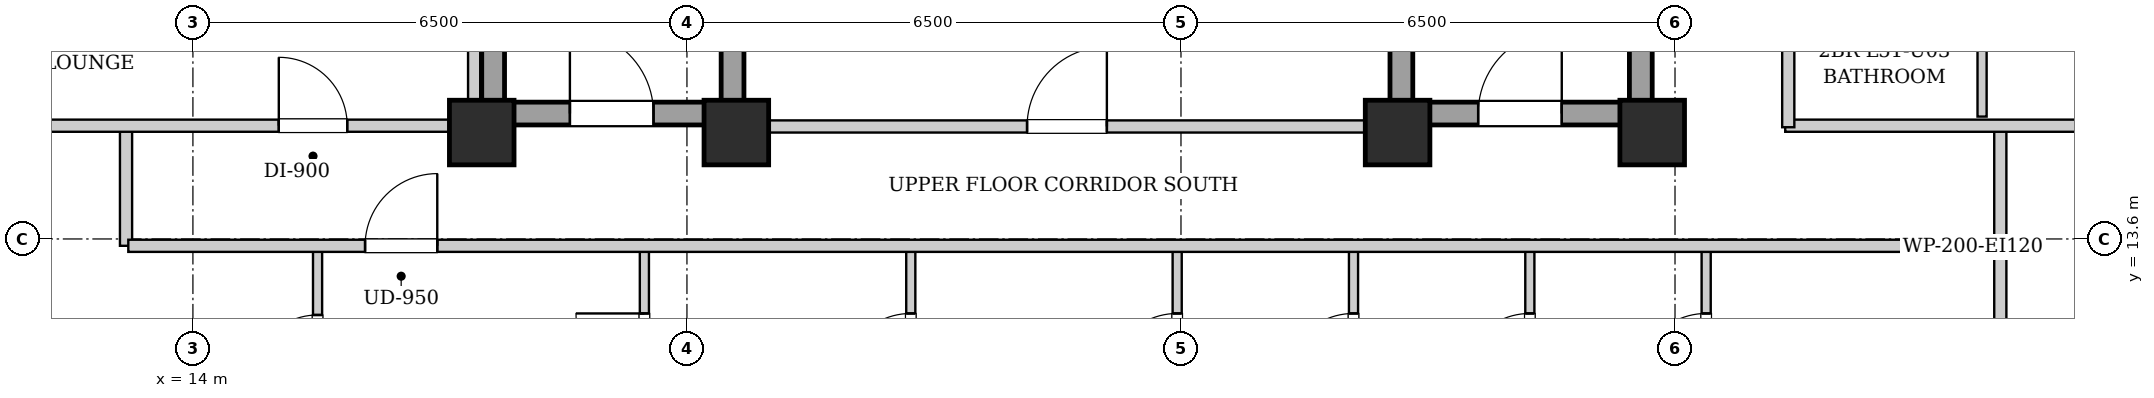
"""IFC4 building model, lengths in metres.
Left out: names, types, materials, properties, quantities, classifications, styles, units other than length and angle.
Written with IfcOpenShell. Run it as: python <this file> out.ifc"""

import sys

from ifc_helpers import new_model, si_unit, direction, frame, frame_2d, origin, origin_2d, place, context, subcontext, project, spatial, rectangle, extrude, element, fill, save


model = new_model("IFC4")
c1 = context("Model", 3, precision=1e-05, world=origin(), true_north=direction((0.0, 1.0)))
c2 = subcontext(c1, "Body", "Model", "MODEL_VIEW")
j1 = project(units=[si_unit("LENGTHUNIT", "METRE"), si_unit("PLANEANGLEUNIT", "RADIAN")], contexts=[c1])
p1 = place(None, origin())
s1 = spatial("IfcSite", under=j1, at=p1, CompositionType="ELEMENT")
p2 = place(p1, origin())
s2 = spatial("IfcBuilding", under=s1, at=p2, CompositionType="ELEMENT")
p3 = place(p2, frame((0.0, 0.0, 177.7)))
s3 = spatial("IfcBuildingStorey", under=s2, at=p3, CompositionType="ELEMENT", Elevation=177.7)
for number, where, z_axis, x_axis in (
    (1, (17.8, 15.0, 0.0), (0.0, 0.0, 1.0), (1.0, 0.0, 0.0)),
    (2, (21.15, 15.0, 0.0), (0.0, 0.0, 1.0), (1.0, 0.0, 0.0)),
    (3, (29.85, 15.0, 0.0), (0.0, 0.0, 1.0), (1.0, 0.0, 0.0)),
    (4, (33.2, 15.0, 0.0), (0.0, 0.0, 1.0), (1.0, 0.0, 0.0)),
):
    element("IfcColumn", number, at=place(p3, frame(where, z_axis=z_axis, x_axis=x_axis)), inside=s3, PredefinedType="COLUMN", context=c2, shape_type="SweptSolid", body=[
        extrude(rectangle(XDim=0.85, YDim=0.85, at=origin_2d()), origin(), (0.0, 0.0, 1.0), 3.3),
    ])
for number, where, z_axis, x_axis in (
    (5, (17.95, 15.1, 0.0), (0.0, 0.0, 1.0), (0.0, 1.0, 0.0)),
    (6, (21.1, 15.1, 0.0), (0.0, 0.0, 1.0), (0.0, 1.0, 0.0)),
):
    element("IfcWall", number, at=place(p3, frame(where, z_axis=z_axis, x_axis=x_axis)), inside=s3, PredefinedType="SHEAR", context=c2, shape_type="SweptSolid", body=[
        extrude(rectangle(XDim=9.0, YDim=0.3, at=frame_2d((4.5, 0.0))), origin(), (0.0, 0.0, 1.0), 3.04),
    ])
p4 = place(p3, frame((18.1, 15.25, 0.0), z_axis=(0.0, 0.0, 1.0), x_axis=(1.0, 0.0, 0.0)))
e7 = element("IfcWall", 7, at=p4, inside=s3, PredefinedType="SHEAR", context=c2, shape_type="SweptSolid", body=[
    extrude(rectangle(XDim=2.85, YDim=0.3, at=frame_2d((1.425, 0.0))), origin(), (0.0, 0.0, 1.0), 3.04),
])
p5 = place(p4, frame((0.86, 0.0, 0.0)))
e8 = element("IfcOpeningElement", 8, at=p5, cuts=e7, PredefinedType="OPENING", context=c2, shape_type="SweptSolid", body=[
    extrude(rectangle(XDim=1.1, YDim=2.05, at=frame_2d((0.55, 1.025))), frame((0.0, 0.16, 0.0), z_axis=(0.0, -1.0, 0.0), x_axis=(1.0, 0.0, 0.0)), (0.0, 0.0, 1.0), 0.32),
])
for number, where, z_axis, x_axis in (
    (9, (29.9, 15.1, 0.0), (0.0, 0.0, 1.0), (0.0, 1.0, 0.0)),
    (10, (33.05, 15.1, 0.0), (0.0, 0.0, 1.0), (0.0, 1.0, 0.0)),
):
    element("IfcWall", number, at=place(p3, frame(where, z_axis=z_axis, x_axis=x_axis)), inside=s3, PredefinedType="SHEAR", context=c2, shape_type="SweptSolid", body=[
        extrude(rectangle(XDim=9.0, YDim=0.3, at=frame_2d((4.5, 0.0))), origin(), (0.0, 0.0, 1.0), 3.04),
    ])
p6 = place(p3, frame((30.05, 15.25, 0.0), z_axis=(0.0, 0.0, 1.0), x_axis=(1.0, 0.0, 0.0)))
e11 = element("IfcWall", 11, at=p6, inside=s3, PredefinedType="SHEAR", context=c2, shape_type="SweptSolid", body=[
    extrude(rectangle(XDim=2.85, YDim=0.3, at=frame_2d((1.425, 0.0))), origin(), (0.0, 0.0, 1.0), 3.04),
])
p7 = place(p6, frame((0.86, 0.0, 0.0)))
e12 = element("IfcOpeningElement", 12, at=p7, cuts=e11, PredefinedType="OPENING", context=c2, shape_type="SweptSolid", body=[
    extrude(rectangle(XDim=1.1, YDim=2.05, at=frame_2d((0.55, 1.025))), frame((0.0, 0.16, 0.0), z_axis=(0.0, -1.0, 0.0), x_axis=(1.0, 0.0, 0.0)), (0.0, 0.0, 1.0), 0.32),
])
p8 = place(p3, frame((21.25, 15.08, 0.0), z_axis=(0.0, 0.0, 1.0), x_axis=(1.0, 0.0, 0.0)))
e13 = element("IfcWall", 13, at=p8, inside=s3, PredefinedType="PARTITIONING", context=c2, shape_type="SweptSolid", body=[
    extrude(rectangle(XDim=8.5, YDim=0.16, at=frame_2d((4.25, 0.0))), origin(), (0.0, 0.0, 1.0), 2.556),
])
p9 = place(p8, frame((3.725, 0.0, 0.0)))
e14 = element("IfcOpeningElement", 14, at=p9, cuts=e13, PredefinedType="OPENING", context=c2, shape_type="SweptSolid", body=[
    extrude(rectangle(XDim=1.05, YDim=2.05, at=frame_2d((0.525, 1.025))), frame((0.0, 0.09, 0.0), z_axis=(0.0, -1.0, 0.0), x_axis=(1.0, 0.0, 0.0)), (0.0, 0.0, 1.0), 0.18),
])
for number, where, z_axis, x_axis in (
    (15, (13.12, 13.51, 0.0), (0.0, 0.0, 1.0), (0.0, 1.0, 0.0)),
    (16, (37.78, 13.51, 0.0), (0.0, 0.0, 1.0), (0.0, 1.0, 0.0)),
):
    element("IfcWall", number, at=place(p3, frame(where, z_axis=z_axis, x_axis=x_axis)), inside=s3, PredefinedType="PARTITIONING", context=c2, shape_type="SweptSolid", body=[
        extrude(rectangle(XDim=1.58, YDim=0.16, at=frame_2d((0.79, 0.0))), origin(), (0.0, 0.0, 1.0), 3.04),
    ])
p10 = place(p3, frame((10.88, 15.09, 0.0), z_axis=(0.0, 0.0, 1.0), x_axis=(1.0, 0.0, 0.0)))
e17 = element("IfcWall", 17, at=p10, inside=s3, PredefinedType="PARTITIONING", context=c2, shape_type="SweptSolid", body=[
    extrude(rectangle(XDim=6.88, YDim=0.16, at=frame_2d((3.44, 0.0))), origin(), (0.0, 0.0, 1.0), 2.556),
])
p11 = place(p10, frame((4.25, 0.0, 0.0)))
e18 = element("IfcOpeningElement", 18, at=p11, cuts=e17, PredefinedType="OPENING", context=c2, shape_type="SweptSolid", body=[
    extrude(rectangle(XDim=0.9, YDim=2.05, at=frame_2d((0.45, 1.025))), frame((0.0, 0.09, 0.0), z_axis=(0.0, -1.0, 0.0), x_axis=(1.0, 0.0, 0.0)), (0.0, 0.0, 1.0), 0.18),
])
p12 = place(p3, frame((34.95, 15.09, 0.0), z_axis=(0.0, 0.0, 1.0), x_axis=(1.0, 0.0, 0.0)))
e19 = element("IfcWall", 19, at=p12, inside=s3, PredefinedType="PARTITIONING", context=c2, shape_type="SweptSolid", body=[
    extrude(rectangle(XDim=5.07, YDim=0.16, at=frame_2d((2.535, 0.0))), origin(), (0.0, 0.0, 1.0), 2.556),
])
p13 = place(p3, frame((37.78, 10.81, 0.0), z_axis=(0.0, 0.0, 1.0), x_axis=(0.0, 1.0, 0.0)))
e20 = element("IfcWall", 20, at=p13, inside=s3, PredefinedType="PARTITIONING", context=c2, shape_type="SweptSolid", body=[
    extrude(rectangle(XDim=2.66, YDim=0.16, at=frame_2d((1.33, 0.0))), origin(), (0.0, 0.0, 1.0), 3.04),
])
p14 = place(p3, frame((15.64, 10.87, 0.0), z_axis=(0.0, 0.0, 1.0), x_axis=(0.0, 1.0, 0.0)))
e21 = element("IfcWall", 21, at=p14, inside=s3, PredefinedType="PARTITIONING", context=c2, shape_type="SweptSolid", body=[
    extrude(rectangle(XDim=2.6, YDim=0.12, at=frame_2d((1.3, 0.0))), origin(), (0.0, 0.0, 1.0), 3.04),
])
p15 = place(p14, frame((0.87, 0.0, 0.0)))
e22 = element("IfcOpeningElement", 22, at=p15, cuts=e21, PredefinedType="OPENING", context=c2, shape_type="SweptSolid", body=[
    extrude(rectangle(XDim=0.86, YDim=2.05, at=frame_2d((0.43, 1.025))), frame((0.0, 0.07, 0.0), z_axis=(0.0, -1.0, 0.0), x_axis=(1.0, 0.0, 0.0)), (0.0, 0.0, 1.0), 0.14),
])
p16 = place(p3, frame((19.94, 10.87, 0.0), z_axis=(0.0, 0.0, 1.0), x_axis=(0.0, 1.0, 0.0)))
e23 = element("IfcWall", 23, at=p16, inside=s3, PredefinedType="PARTITIONING", context=c2, shape_type="SweptSolid", body=[
    extrude(rectangle(XDim=2.6, YDim=0.12, at=frame_2d((1.3, 0.0))), origin(), (0.0, 0.0, 1.0), 3.04),
])
p17 = place(p16, frame((0.85, 0.0, 0.0)))
e24 = element("IfcOpeningElement", 24, at=p17, cuts=e23, PredefinedType="OPENING", context=c2, shape_type="SweptSolid", body=[
    extrude(rectangle(XDim=0.9, YDim=2.05, at=frame_2d((0.45, 1.025))), frame((0.0, 0.07, 0.0), z_axis=(0.0, -1.0, 0.0), x_axis=(1.0, 0.0, 0.0)), (0.0, 0.0, 1.0), 0.14),
])
p18 = place(p3, frame((23.445, 10.87, 0.0), z_axis=(0.0, 0.0, 1.0), x_axis=(0.0, 1.0, 0.0)))
e25 = element("IfcWall", 25, at=p18, inside=s3, PredefinedType="PARTITIONING", context=c2, shape_type="SweptSolid", body=[
    extrude(rectangle(XDim=2.6, YDim=0.12, at=frame_2d((1.3, 0.0))), origin(), (0.0, 0.0, 1.0), 3.04),
])
p19 = place(p18, frame((0.85, 0.0, 0.0)))
e26 = element("IfcOpeningElement", 26, at=p19, cuts=e25, PredefinedType="OPENING", context=c2, shape_type="SweptSolid", body=[
    extrude(rectangle(XDim=0.9, YDim=2.05, at=frame_2d((0.45, 1.025))), frame((0.0, 0.07, 0.0), z_axis=(0.0, -1.0, 0.0), x_axis=(1.0, 0.0, 0.0)), (0.0, 0.0, 1.0), 0.14),
])
p20 = place(p3, frame((26.95, 10.87, 0.0), z_axis=(0.0, 0.0, 1.0), x_axis=(0.0, 1.0, 0.0)))
e27 = element("IfcWall", 27, at=p20, inside=s3, PredefinedType="PARTITIONING", context=c2, shape_type="SweptSolid", body=[
    extrude(rectangle(XDim=2.6, YDim=0.12, at=frame_2d((1.3, 0.0))), origin(), (0.0, 0.0, 1.0), 3.04),
])
p21 = place(p20, frame((0.85, 0.0, 0.0)))
e28 = element("IfcOpeningElement", 28, at=p21, cuts=e27, PredefinedType="OPENING", context=c2, shape_type="SweptSolid", body=[
    extrude(rectangle(XDim=0.9, YDim=2.05, at=frame_2d((0.45, 1.025))), frame((0.0, 0.07, 0.0), z_axis=(0.0, -1.0, 0.0), x_axis=(1.0, 0.0, 0.0)), (0.0, 0.0, 1.0), 0.14),
])
p22 = place(p3, frame((29.27, 10.87, 0.0), z_axis=(0.0, 0.0, 1.0), x_axis=(0.0, 1.0, 0.0)))
e29 = element("IfcWall", 29, at=p22, inside=s3, PredefinedType="PARTITIONING", context=c2, shape_type="SweptSolid", body=[
    extrude(rectangle(XDim=2.6, YDim=0.12, at=frame_2d((1.3, 0.0))), origin(), (0.0, 0.0, 1.0), 3.04),
])
p23 = place(p22, frame((0.85, 0.0, 0.0)))
e30 = element("IfcOpeningElement", 30, at=p23, cuts=e29, PredefinedType="OPENING", context=c2, shape_type="SweptSolid", body=[
    extrude(rectangle(XDim=0.9, YDim=2.05, at=frame_2d((0.45, 1.025))), frame((0.0, 0.07, 0.0), z_axis=(0.0, -1.0, 0.0), x_axis=(1.0, 0.0, 0.0)), (0.0, 0.0, 1.0), 0.14),
])
p24 = place(p3, frame((31.59, 10.87, 0.0), z_axis=(0.0, 0.0, 1.0), x_axis=(0.0, 1.0, 0.0)))
e31 = element("IfcWall", 31, at=p24, inside=s3, PredefinedType="PARTITIONING", context=c2, shape_type="SweptSolid", body=[
    extrude(rectangle(XDim=2.6, YDim=0.12, at=frame_2d((1.3, 0.0))), origin(), (0.0, 0.0, 1.0), 3.04),
])
p25 = place(p24, frame((0.85, 0.0, 0.0)))
e32 = element("IfcOpeningElement", 32, at=p25, cuts=e31, PredefinedType="OPENING", context=c2, shape_type="SweptSolid", body=[
    extrude(rectangle(XDim=0.9, YDim=2.05, at=frame_2d((0.45, 1.025))), frame((0.0, 0.07, 0.0), z_axis=(0.0, -1.0, 0.0), x_axis=(1.0, 0.0, 0.0)), (0.0, 0.0, 1.0), 0.14),
])
p26 = place(p3, frame((33.91, 10.87, 0.0), z_axis=(0.0, 0.0, 1.0), x_axis=(0.0, 1.0, 0.0)))
e33 = element("IfcWall", 33, at=p26, inside=s3, PredefinedType="PARTITIONING", context=c2, shape_type="SweptSolid", body=[
    extrude(rectangle(XDim=2.6, YDim=0.12, at=frame_2d((1.3, 0.0))), origin(), (0.0, 0.0, 1.0), 3.04),
])
p27 = place(p26, frame((0.85, 0.0, 0.0)))
e34 = element("IfcOpeningElement", 34, at=p27, cuts=e33, PredefinedType="OPENING", context=c2, shape_type="SweptSolid", body=[
    extrude(rectangle(XDim=0.9, YDim=2.05, at=frame_2d((0.45, 1.025))), frame((0.0, 0.07, 0.0), z_axis=(0.0, -1.0, 0.0), x_axis=(1.0, 0.0, 0.0)), (0.0, 0.0, 1.0), 0.14),
])
p28 = place(p3, frame((37.54, 15.21, 0.0), z_axis=(0.0, 0.0, 1.0), x_axis=(0.0, 1.0, 0.0)))
e35 = element("IfcWall", 35, at=p28, inside=s3, PredefinedType="PARTITIONING", context=c2, shape_type="SweptSolid", body=[
    extrude(rectangle(XDim=2.3, YDim=0.12, at=frame_2d((1.15, 0.0))), origin(), (0.0, 0.0, 1.0), 3.04),
])
p29 = place(p3, frame((13.15, 13.51, 0.0), z_axis=(0.0, 0.0, 1.0), x_axis=(1.0, 0.0, 0.0)))
e36 = element("IfcWall", 36, at=p29, inside=s3, PredefinedType="PARTITIONING", context=c2, shape_type="SweptSolid", body=[
    extrude(rectangle(XDim=24.6, YDim=0.16, at=frame_2d((12.3, 0.0))), origin(), (0.0, 0.0, 1.0), 3.04),
])
p30 = place(p29, frame((3.115, 0.0, 0.0)))
e37 = element("IfcOpeningElement", 37, at=p30, cuts=e36, PredefinedType="OPENING", context=c2, shape_type="SweptSolid", body=[
    extrude(rectangle(XDim=0.95, YDim=2.1, at=frame_2d((0.475, 1.05))), frame((0.0, 0.09, 0.0), z_axis=(0.0, -1.0, 0.0), x_axis=(1.0, 0.0, 0.0)), (0.0, 0.0, 1.0), 0.18),
])
p31 = place(p3, frame((17.7, 15.02, 0.0), z_axis=(0.0, 0.0, 1.0), x_axis=(0.0, 1.0, 0.0)))
e38 = element("IfcWall", 38, at=p31, inside=s3, PredefinedType="PARTITIONING", context=c2, shape_type="SweptSolid", body=[
    extrude(rectangle(XDim=13.98, YDim=0.16, at=frame_2d((6.99, 0.0))), origin(), (0.0, 0.0, 1.0), 2.375),
])
p32 = place(p3, frame((34.99, 15.07, 0.0), z_axis=(0.0, 0.0, 1.0), x_axis=(0.0, 1.0, 0.0)))
e39 = element("IfcWall", 39, at=p32, inside=s3, PredefinedType="PARTITIONING", context=c2, shape_type="SweptSolid", body=[
    extrude(rectangle(XDim=13.93, YDim=0.16, at=frame_2d((6.965, 0.0))), origin(), (0.0, 0.0, 1.0), 3.04),
])
p33 = place(p32, frame((4.385, 0.0, 0.0)))
e40 = element("IfcOpeningElement", 40, at=p33, cuts=e39, PredefinedType="OPENING", context=c2, shape_type="SweptSolid", body=[
    extrude(rectangle(XDim=0.95, YDim=2.1, at=frame_2d((0.475, 1.05))), frame((0.0, 0.09, 0.0), z_axis=(0.0, -1.0, 0.0), x_axis=(1.0, 0.0, 0.0)), (0.0, 0.0, 1.0), 0.18),
])
p34 = place(p5, origin())
e41 = element("IfcDoor", 41, at=p34, inside=s3, OperationType="SINGLE_SWING_LEFT", PredefinedType="DOOR", context=c2, shape_type="SweptSolid", body=[
    extrude(rectangle(XDim=1.1, YDim=2.05, at=frame_2d((0.55, 1.025))), frame((0.0, 0.025, 0.0), z_axis=(0.0, -1.0, 0.0), x_axis=(1.0, 0.0, 0.0)), (0.0, 0.0, 1.0), 0.05),
])
fill(e8, e41)
p35 = place(p7, origin())
e42 = element("IfcDoor", 42, at=p35, inside=s3, OperationType="SINGLE_SWING_RIGHT", PredefinedType="DOOR", context=c2, shape_type="SweptSolid", body=[
    extrude(rectangle(XDim=1.1, YDim=2.05, at=frame_2d((0.55, 1.025))), frame((0.0, 0.025, 0.0), z_axis=(0.0, -1.0, 0.0), x_axis=(1.0, 0.0, 0.0)), (0.0, 0.0, 1.0), 0.05),
])
fill(e12, e42)
p36 = place(p9, origin())
e43 = element("IfcDoor", 43, at=p36, inside=s3, OperationType="SINGLE_SWING_RIGHT", PredefinedType="DOOR", context=c2, shape_type="SweptSolid", body=[
    extrude(rectangle(XDim=1.05, YDim=2.05, at=frame_2d((0.525, 1.025))), frame((0.0, 0.025, 0.0), z_axis=(0.0, -1.0, 0.0), x_axis=(1.0, 0.0, 0.0)), (0.0, 0.0, 1.0), 0.05),
])
fill(e14, e43)
p37 = place(p11, origin())
e44 = element("IfcDoor", 44, at=p37, inside=s3, OperationType="SINGLE_SWING_LEFT", PredefinedType="DOOR", context=c2, shape_type="SweptSolid", body=[
    extrude(rectangle(XDim=0.9, YDim=2.05, at=frame_2d((0.45, 1.025))), frame((0.0, 0.025, 0.0), z_axis=(0.0, -1.0, 0.0), x_axis=(1.0, 0.0, 0.0)), (0.0, 0.0, 1.0), 0.05),
])
fill(e18, e44)
p38 = place(p15, origin())
e45 = element("IfcDoor", 45, at=p38, inside=s3, OperationType="SINGLE_SWING_LEFT", PredefinedType="DOOR", context=c2, shape_type="SweptSolid", body=[
    extrude(rectangle(XDim=0.86, YDim=2.05, at=frame_2d((0.43, 1.025))), frame((0.0, 0.025, 0.0), z_axis=(0.0, -1.0, 0.0), x_axis=(1.0, 0.0, 0.0)), (0.0, 0.0, 1.0), 0.05),
])
fill(e22, e45)
p39 = place(p17, origin())
e46 = element("IfcDoor", 46, at=p39, inside=s3, OperationType="SINGLE_SWING_RIGHT", PredefinedType="DOOR", context=c2, shape_type="SweptSolid", body=[
    extrude(rectangle(XDim=0.9, YDim=2.05, at=frame_2d((0.45, 1.025))), frame((0.0, 0.025, 0.0), z_axis=(0.0, -1.0, 0.0), x_axis=(1.0, 0.0, 0.0)), (0.0, 0.0, 1.0), 0.05),
])
fill(e24, e46)
p40 = place(p19, origin())
e47 = element("IfcDoor", 47, at=p40, inside=s3, OperationType="SINGLE_SWING_LEFT", PredefinedType="DOOR", context=c2, shape_type="SweptSolid", body=[
    extrude(rectangle(XDim=0.9, YDim=2.05, at=frame_2d((0.45, 1.025))), frame((0.0, 0.025, 0.0), z_axis=(0.0, -1.0, 0.0), x_axis=(1.0, 0.0, 0.0)), (0.0, 0.0, 1.0), 0.05),
])
fill(e26, e47)
p41 = place(p21, origin())
e48 = element("IfcDoor", 48, at=p41, inside=s3, OperationType="SINGLE_SWING_LEFT", PredefinedType="DOOR", context=c2, shape_type="SweptSolid", body=[
    extrude(rectangle(XDim=0.9, YDim=2.05, at=frame_2d((0.45, 1.025))), frame((0.0, 0.025, 0.0), z_axis=(0.0, -1.0, 0.0), x_axis=(1.0, 0.0, 0.0)), (0.0, 0.0, 1.0), 0.05),
])
fill(e28, e48)
p42 = place(p23, origin())
e49 = element("IfcDoor", 49, at=p42, inside=s3, OperationType="SINGLE_SWING_LEFT", PredefinedType="DOOR", context=c2, shape_type="SweptSolid", body=[
    extrude(rectangle(XDim=0.9, YDim=2.05, at=frame_2d((0.45, 1.025))), frame((0.0, 0.025, 0.0), z_axis=(0.0, -1.0, 0.0), x_axis=(1.0, 0.0, 0.0)), (0.0, 0.0, 1.0), 0.05),
])
fill(e30, e49)
p43 = place(p25, origin())
e50 = element("IfcDoor", 50, at=p43, inside=s3, OperationType="SINGLE_SWING_LEFT", PredefinedType="DOOR", context=c2, shape_type="SweptSolid", body=[
    extrude(rectangle(XDim=0.9, YDim=2.05, at=frame_2d((0.45, 1.025))), frame((0.0, 0.025, 0.0), z_axis=(0.0, -1.0, 0.0), x_axis=(1.0, 0.0, 0.0)), (0.0, 0.0, 1.0), 0.05),
])
fill(e32, e50)
p44 = place(p27, origin())
e51 = element("IfcDoor", 51, at=p44, inside=s3, OperationType="SINGLE_SWING_LEFT", PredefinedType="DOOR", context=c2, shape_type="SweptSolid", body=[
    extrude(rectangle(XDim=0.9, YDim=2.05, at=frame_2d((0.45, 1.025))), frame((0.0, 0.025, 0.0), z_axis=(0.0, -1.0, 0.0), x_axis=(1.0, 0.0, 0.0)), (0.0, 0.0, 1.0), 0.05),
])
fill(e34, e51)
p45 = place(p30, origin())
e52 = element("IfcDoor", 52, at=p45, inside=s3, OperationType="SINGLE_SWING_RIGHT", PredefinedType="DOOR", context=c2, shape_type="SweptSolid", body=[
    extrude(rectangle(XDim=0.95, YDim=2.1, at=frame_2d((0.475, 1.05))), frame((0.0, 0.025, 0.0), z_axis=(0.0, -1.0, 0.0), x_axis=(1.0, 0.0, 0.0)), (0.0, 0.0, 1.0), 0.05),
])
fill(e37, e52)
save(model, sys.argv[1])
